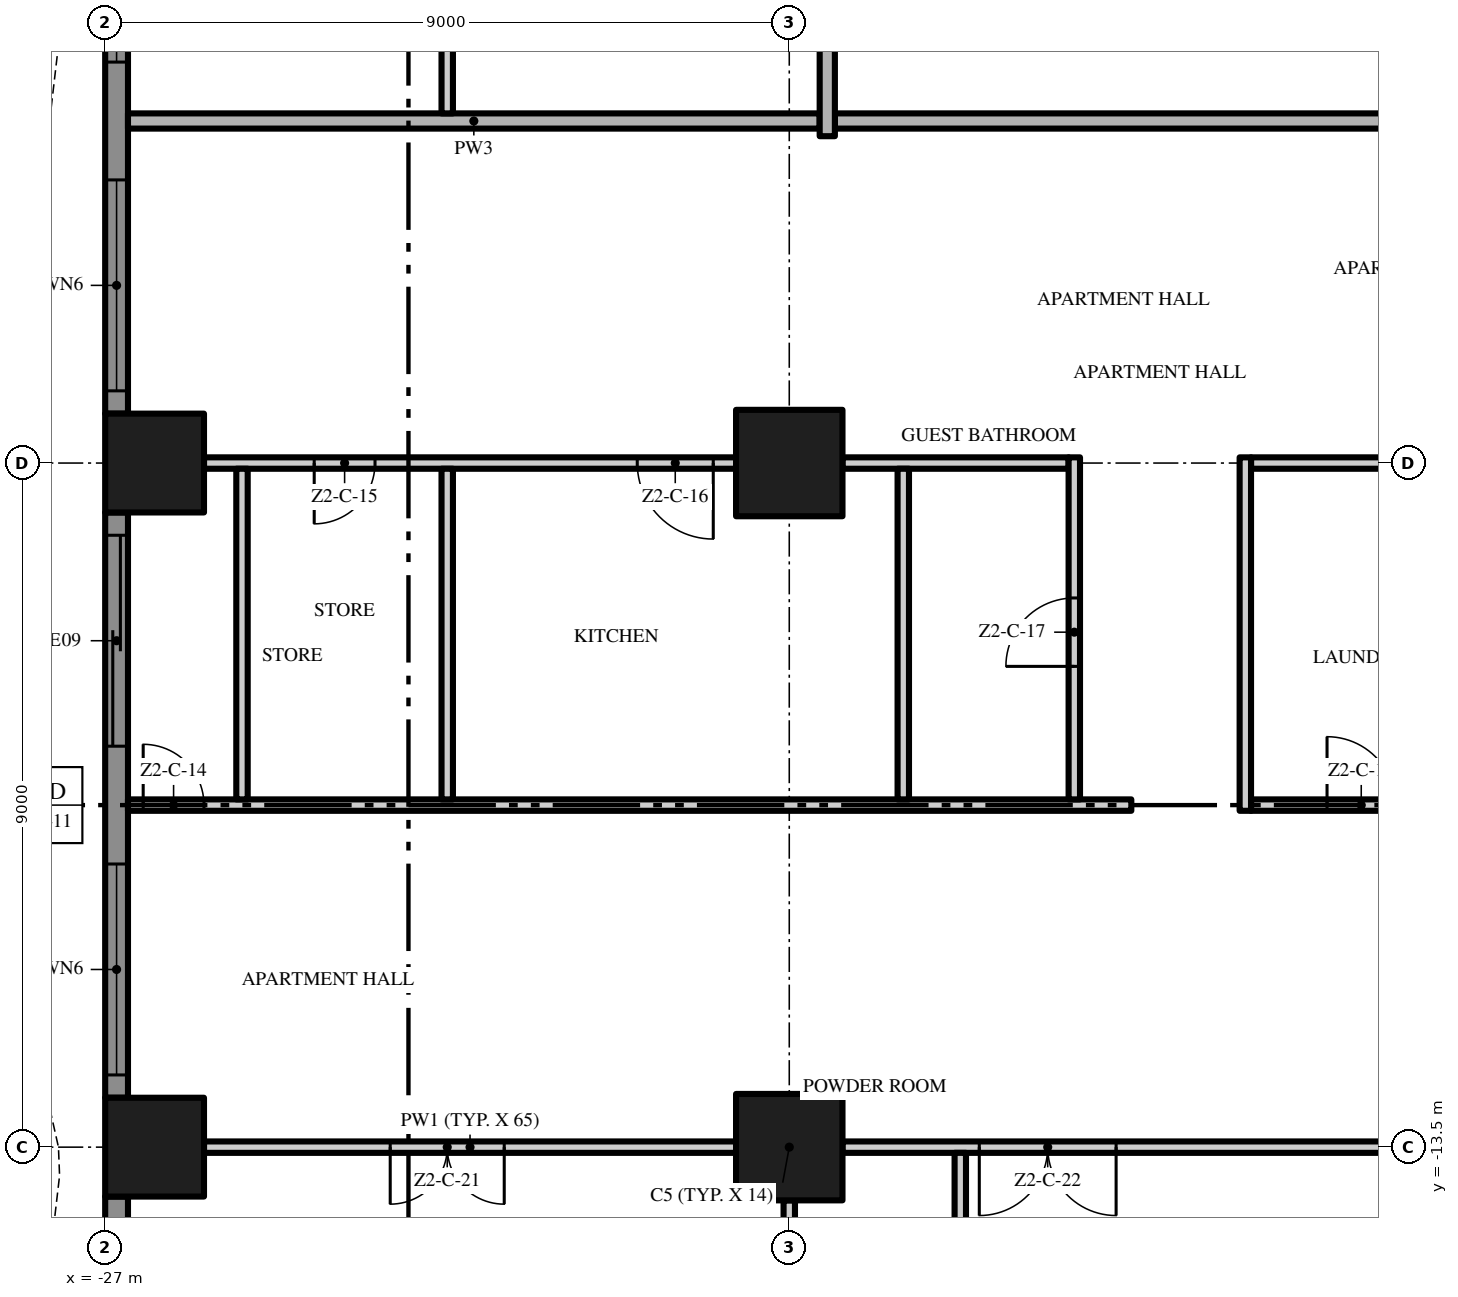
"""IFC4 building model, lengths in metres.
Left out: names, types, materials, properties, quantities, classifications, styles, units other than length and angle.
Written with IfcOpenShell. Run it as: python <this file> out.ifc"""

import sys

from ifc_helpers import new_model, si_unit, direction, frame, frame_2d, origin, origin_2d, place, context, subcontext, project, spatial, polyline, rectangle, outline, extrude, element, fill, save


model = new_model("IFC4")
c1 = context("Model", 3, precision=1e-05, world=origin(), true_north=direction((0.0, 1.0)))
c2 = subcontext(c1, "Body", "Model", "MODEL_VIEW")
j1 = project(units=[si_unit("LENGTHUNIT", "METRE"), si_unit("PLANEANGLEUNIT", "RADIAN")], contexts=[c1])
p1 = place(None, origin())
s1 = spatial("IfcSite", under=j1, at=p1, CompositionType="ELEMENT")
p2 = place(p1, origin())
s2 = spatial("IfcBuilding", under=s1, at=p2, CompositionType="ELEMENT")
p3 = place(p2, frame((0.0, 0.0, 96.0)))
s3 = spatial("IfcBuildingStorey", under=s2, at=p3, CompositionType="ELEMENT", Elevation=96.0)
for number, where, z_axis, x_axis in (
    (1, (-18.0, -13.5, 0.0), (0.0, 0.0, 1.0), (1.0, 0.0, 0.0)),
    (2, (-18.0, -4.5, 0.0), (0.0, 0.0, 1.0), (1.0, 0.0, 0.0)),
):
    element("IfcColumn", number, at=place(p3, frame(where, z_axis=z_axis, x_axis=x_axis)), inside=s3, PredefinedType="COLUMN", context=c2, shape_type="SweptSolid", body=[
        extrude(rectangle(XDim=1.4, YDim=1.4, at=origin_2d()), origin(), (0.0, 0.0, 1.0), 3.5),
    ])
for number, where, z_axis, x_axis in (
    (3, (-26.35, -13.5, 0.0), (0.0, 0.0, 1.0), (1.0, 0.0, 0.0)),
    (4, (-26.35, -4.5, 0.0), (0.0, 0.0, 1.0), (1.0, 0.0, 0.0)),
):
    element("IfcColumn", number, at=place(p3, frame(where, z_axis=z_axis, x_axis=x_axis)), inside=s3, PredefinedType="COLUMN", context=c2, shape_type="SweptSolid", body=[
        extrude(rectangle(XDim=1.3, YDim=1.3, at=origin_2d()), origin(), (0.0, 0.0, 1.0), 3.5),
    ])
p4 = place(p3, frame((-26.85, -3.85, 0.0), z_axis=(0.0, 0.0, 1.0), x_axis=(0.0, 1.0, 0.0)))
e5 = element("IfcWall", 5, at=p4, inside=s3, PredefinedType="SOLIDWALL", context=c2, shape_type="SweptSolid", body=[
    extrude(rectangle(XDim=7.7, YDim=0.3, at=frame_2d((3.85, 0.0))), origin(), (0.0, 0.0, 1.0), 3.5),
])
p5 = place(p4, frame((4.625, 0.0, 0.45)))
e6 = element("IfcOpeningElement", 6, at=p5, cuts=e5, PredefinedType="OPENING", context=c2, shape_type="SweptSolid", body=[
    extrude(rectangle(XDim=2.775, YDim=2.65, at=frame_2d((1.387, 1.325))), frame((0.0, 0.16, 0.0), z_axis=(0.0, -1.0, 0.0), x_axis=(1.0, 0.0, 0.0)), (0.0, 0.0, 1.0), 0.32),
])
p6 = place(p4, frame((0.3, 0.0, 0.45)))
e7 = element("IfcOpeningElement", 7, at=p6, cuts=e5, PredefinedType="OPENING", context=c2, shape_type="SweptSolid", body=[
    extrude(rectangle(XDim=2.775, YDim=2.65, at=frame_2d((1.387, 1.325))), frame((0.0, 0.16, 0.0), z_axis=(0.0, -1.0, 0.0), x_axis=(1.0, 0.0, 0.0)), (0.0, 0.0, 1.0), 0.32),
])
p7 = place(p3, frame((-26.85, -12.85, 0.0), z_axis=(0.0, 0.0, 1.0), x_axis=(0.0, 1.0, 0.0)))
e8 = element("IfcWall", 8, at=p7, inside=s3, PredefinedType="SOLIDWALL", context=c2, shape_type="SweptSolid", body=[
    extrude(rectangle(XDim=7.7, YDim=0.3, at=frame_2d((3.85, 0.0))), origin(), (0.0, 0.0, 1.0), 3.5),
])
p8 = place(p7, frame((4.625, 0.0, 0.0)))
e9 = element("IfcOpeningElement", 9, at=p8, cuts=e8, PredefinedType="OPENING", context=c2, shape_type="SweptSolid", body=[
    extrude(rectangle(XDim=2.775, YDim=2.4, at=frame_2d((1.387, 1.2))), frame((0.0, 0.16, 0.0), z_axis=(0.0, -1.0, 0.0), x_axis=(1.0, 0.0, 0.0)), (0.0, 0.0, 1.0), 0.32),
])
p9 = place(p7, frame((0.3, 0.0, 0.45)))
e10 = element("IfcOpeningElement", 10, at=p9, cuts=e8, PredefinedType="OPENING", context=c2, shape_type="SweptSolid", body=[
    extrude(rectangle(XDim=2.775, YDim=2.65, at=frame_2d((1.387, 1.325))), frame((0.0, 0.16, 0.0), z_axis=(0.0, -1.0, 0.0), x_axis=(1.0, 0.0, 0.0)), (0.0, 0.0, 1.0), 0.32),
])
p10 = place(p3, frame((-26.85, -18.0, 0.0), z_axis=(0.0, 0.0, 1.0), x_axis=(0.0, 1.0, 0.0)))
e11 = element("IfcWall", 11, at=p10, inside=s3, PredefinedType="SOLIDWALL", context=c2, shape_type="SweptSolid", body=[
    extrude(rectangle(XDim=3.85, YDim=0.3, at=frame_2d((1.925, 0.0))), origin(), (0.0, 0.0, 1.0), 3.5),
])
p11 = place(p10, frame((0.775, 0.0, 0.45)))
e12 = element("IfcOpeningElement", 12, at=p11, cuts=e11, PredefinedType="OPENING", context=c2, shape_type="SweptSolid", body=[
    extrude(rectangle(XDim=2.775, YDim=2.65, at=frame_2d((1.387, 1.325))), frame((0.0, 0.16, 0.0), z_axis=(0.0, -1.0, 0.0), x_axis=(1.0, 0.0, 0.0)), (0.0, 0.0, 1.0), 0.32),
])
p12 = place(p3, origin())
e13 = element("IfcWall", 13, at=p12, inside=s3, PredefinedType="USERDEFINED", context=c2, shape_type="SweptSolid", body=[
    extrude(outline(polyline([(-27.951, 18.0), (-27.615, 16.5), (-27.6, 16.125), (-27.731, 15.0), (-28.255, 13.5), (-28.988, 12.0), (-29.649, 10.5), (-29.985, 9.0), (-30.0, 8.625), (-29.869, 7.5), (-29.345, 6.0), (-28.612, 4.5), (-27.951, 3.0), (-27.615, 1.5), (-27.6, 1.125), (-27.731, 0.0), (-28.255, -1.5), (-28.988, -3.0), (-29.649, -4.5), (-29.985, -6.0), (-30.0, -6.375), (-29.869, -7.5), (-29.345, -9.0), (-28.612, -10.5), (-27.951, -12.0), (-27.615, -13.5), (-27.6, -13.875), (-27.731, -15.0), (-28.255, -16.5), (-28.988, -18.0), (-28.763, -18.11), (-28.024, -16.596), (-27.486, -15.056), (-27.349, -13.885), (-27.366, -13.467), (-27.713, -11.921), (-28.385, -10.395), (-29.114, -8.904), (-29.624, -7.444), (-29.749, -6.365), (-29.736, -6.033), (-29.41, -4.579), (-28.761, -3.105), (-28.024, -1.596), (-27.486, -0.056), (-27.349, 1.115), (-27.366, 1.533), (-27.713, 3.079), (-28.385, 4.605), (-29.114, 6.096), (-29.624, 7.556), (-29.749, 8.635), (-29.736, 8.967), (-29.41, 10.421), (-28.761, 11.895), (-28.024, 13.404), (-27.486, 14.944), (-27.349, 16.115), (-27.366, 16.533), (-27.708, 18.055), (-27.951, 18.0)])), origin(), (0.0, 0.0, 1.0), 0.9),
])
p13 = place(p3, frame((-18.7, -13.5, 0.0), z_axis=(0.0, 0.0, 1.0), x_axis=(-1.0, 0.0, 0.0)))
e14 = element("IfcWall", 14, at=p13, inside=s3, PredefinedType="PARTITIONING", context=c2, shape_type="SweptSolid", body=[
    extrude(rectangle(XDim=7.0, YDim=0.15, at=frame_2d((3.5, 0.0))), origin(), (0.0, 0.0, 1.0), 3.5),
])
p14 = place(p13, frame((3.05, 0.0, 0.0)))
e15 = element("IfcOpeningElement", 15, at=p14, cuts=e14, PredefinedType="OPENING", context=c2, shape_type="SweptSolid", body=[
    extrude(rectangle(XDim=1.5, YDim=2.4, at=frame_2d((0.75, 1.2))), frame((0.0, 0.085, 0.0), z_axis=(0.0, -1.0, 0.0), x_axis=(1.0, 0.0, 0.0)), (0.0, 0.0, 1.0), 0.17),
])
p15 = place(p3, frame((-9.7, -13.5, 0.0), z_axis=(0.0, 0.0, 1.0), x_axis=(-1.0, 0.0, 0.0)))
e16 = element("IfcWall", 16, at=p15, inside=s3, PredefinedType="PARTITIONING", context=c2, shape_type="SweptSolid", body=[
    extrude(rectangle(XDim=7.6, YDim=0.15, at=frame_2d((3.8, 0.0))), origin(), (0.0, 0.0, 1.0), 3.5),
])
p16 = place(p15, frame((4.0, 0.0, 0.0)))
e17 = element("IfcOpeningElement", 17, at=p16, cuts=e16, PredefinedType="OPENING", context=c2, shape_type="SweptSolid", body=[
    extrude(rectangle(XDim=1.8, YDim=2.4, at=frame_2d((0.9, 1.2))), frame((0.0, 0.085, 0.0), z_axis=(0.0, -1.0, 0.0), x_axis=(1.0, 0.0, 0.0)), (0.0, 0.0, 1.0), 0.17),
])
p17 = place(p3, frame((-26.7, -9.0, 0.0), z_axis=(0.0, 0.0, 1.0), x_axis=(1.0, 0.0, 0.0)))
e18 = element("IfcWall", 18, at=p17, inside=s3, PredefinedType="PARTITIONING", context=c2, shape_type="SweptSolid", body=[
    extrude(rectangle(XDim=13.2, YDim=0.15, at=frame_2d((6.6, 0.0))), origin(), (0.0, 0.0, 1.0), 3.5),
])
p18 = place(p17, frame((0.2, 0.0, 0.0)))
e19 = element("IfcOpeningElement", 19, at=p18, cuts=e18, PredefinedType="OPENING", context=c2, shape_type="SweptSolid", body=[
    extrude(rectangle(XDim=0.8, YDim=2.0, at=frame_2d((0.4, 1.0))), frame((0.0, 0.085, 0.0), z_axis=(0.0, -1.0, 0.0), x_axis=(1.0, 0.0, 0.0)), (0.0, 0.0, 1.0), 0.17),
])
p19 = place(p3, frame((-11.925, -9.0, 0.0), z_axis=(0.0, 0.0, 1.0), x_axis=(1.0, 0.0, 0.0)))
e20 = element("IfcWall", 20, at=p19, inside=s3, PredefinedType="PARTITIONING", context=c2, shape_type="SweptSolid", body=[
    extrude(rectangle(XDim=11.825, YDim=0.15, at=frame_2d((5.912, 0.0))), origin(), (0.0, 0.0, 1.0), 3.5),
])
p20 = place(p19, frame((1.0, 0.0, 0.0)))
e21 = element("IfcOpeningElement", 21, at=p20, cuts=e20, PredefinedType="OPENING", context=c2, shape_type="SweptSolid", body=[
    extrude(rectangle(XDim=0.9, YDim=2.1, at=frame_2d((0.45, 1.05))), frame((0.0, 0.085, 0.0), z_axis=(0.0, -1.0, 0.0), x_axis=(1.0, 0.0, 0.0)), (0.0, 0.0, 1.0), 0.17),
])
p21 = place(p19, frame((5.075, 0.0, 0.0)))
e22 = element("IfcOpeningElement", 22, at=p21, cuts=e20, PredefinedType="OPENING", context=c2, shape_type="SweptSolid", body=[
    extrude(rectangle(XDim=0.9, YDim=2.1, at=frame_2d((0.45, 1.05))), frame((0.0, 0.085, 0.0), z_axis=(0.0, -1.0, 0.0), x_axis=(1.0, 0.0, 0.0)), (0.0, 0.0, 1.0), 0.17),
])
p22 = place(p3, frame((-18.7, -4.5, 0.0), z_axis=(0.0, 0.0, 1.0), x_axis=(-1.0, 0.0, 0.0)))
e23 = element("IfcWall", 23, at=p22, inside=s3, PredefinedType="PARTITIONING", context=c2, shape_type="SweptSolid", body=[
    extrude(rectangle(XDim=7.0, YDim=0.15, at=frame_2d((3.5, 0.0))), origin(), (0.0, 0.0, 1.0), 3.5),
])
p23 = place(p22, frame((4.75, 0.0, 0.0)))
e24 = element("IfcOpeningElement", 24, at=p23, cuts=e23, PredefinedType="OPENING", context=c2, shape_type="SweptSolid", body=[
    extrude(rectangle(XDim=0.8, YDim=2.0, at=frame_2d((0.4, 1.0))), frame((0.0, 0.085, 0.0), z_axis=(0.0, -1.0, 0.0), x_axis=(1.0, 0.0, 0.0)), (0.0, 0.0, 1.0), 0.17),
])
p24 = place(p22, frame((0.3, 0.0, 0.0)))
e25 = element("IfcOpeningElement", 25, at=p24, cuts=e23, PredefinedType="OPENING", context=c2, shape_type="SweptSolid", body=[
    extrude(rectangle(XDim=1.0, YDim=2.4, at=frame_2d((0.5, 1.2))), frame((0.0, 0.085, 0.0), z_axis=(0.0, -1.0, 0.0), x_axis=(1.0, 0.0, 0.0)), (0.0, 0.0, 1.0), 0.17),
])
p25 = place(p3, frame((-17.3, -4.5, 0.0), z_axis=(0.0, 0.0, 1.0), x_axis=(1.0, 0.0, 0.0)))
e26 = element("IfcWall", 26, at=p25, inside=s3, PredefinedType="PARTITIONING", context=c2, shape_type="SweptSolid", body=[
    extrude(rectangle(XDim=2.975, YDim=0.15, at=frame_2d((1.488, 0.0))), origin(), (0.0, 0.0, 1.0), 3.5),
])
p26 = place(p3, frame((-11.925, -4.5, 0.0), z_axis=(0.0, 0.0, 1.0), x_axis=(1.0, 0.0, 0.0)))
e27 = element("IfcWall", 27, at=p26, inside=s3, PredefinedType="PARTITIONING", context=c2, shape_type="SweptSolid", body=[
    extrude(rectangle(XDim=2.225, YDim=0.15, at=frame_2d((1.113, 0.0))), origin(), (0.0, 0.0, 1.0), 3.5),
])
p27 = place(p3, frame((-0.1, 0.0, 0.0), z_axis=(0.0, 0.0, 1.0), x_axis=(-1.0, 0.0, 0.0)))
e28 = element("IfcWall", 28, at=p27, inside=s3, PredefinedType="PARTITIONING", context=c2, shape_type="SweptSolid", body=[
    extrude(rectangle(XDim=17.3, YDim=0.2, at=frame_2d((8.65, 0.0))), origin(), (0.0, 0.0, 1.0), 3.5),
])
p28 = place(p27, frame((8.15, 0.0, 0.0)))
e29 = element("IfcOpeningElement", 29, at=p28, cuts=e28, PredefinedType="OPENING", context=c2, shape_type="SweptSolid", body=[
    extrude(rectangle(XDim=1.5, YDim=2.4, at=frame_2d((0.75, 1.2))), frame((0.0, 0.11, 0.0), z_axis=(0.0, -1.0, 0.0), x_axis=(1.0, 0.0, 0.0)), (0.0, 0.0, 1.0), 0.22),
])
p29 = place(p3, frame((-26.7, 0.0, 0.0), z_axis=(0.0, 0.0, 1.0), x_axis=(1.0, 0.0, 0.0)))
e30 = element("IfcWall", 30, at=p29, inside=s3, PredefinedType="PARTITIONING", context=c2, shape_type="SweptSolid", body=[
    extrude(rectangle(XDim=9.1, YDim=0.2, at=frame_2d((4.55, 0.0))), origin(), (0.0, 0.0, 1.0), 3.5),
])
for number, where, z_axis, x_axis in (
    (31, (-25.2, -8.925, 0.0), (0.0, 0.0, 1.0), (0.0, 1.0, 0.0)),
    (32, (-22.5, -8.925, 0.0), (0.0, 0.0, 1.0), (0.0, 1.0, 0.0)),
):
    element("IfcWall", number, at=place(p3, frame(where, z_axis=z_axis, x_axis=x_axis)), inside=s3, PredefinedType="PARTITIONING", context=c2, shape_type="SweptSolid", body=[
        extrude(rectangle(XDim=4.35, YDim=0.15, at=frame_2d((2.175, 0.0))), origin(), (0.0, 0.0, 1.0), 3.5),
    ])
p30 = place(p3, frame((-22.5, 0.1, 0.0), z_axis=(0.0, 0.0, 1.0), x_axis=(0.0, 1.0, 0.0)))
e33 = element("IfcWall", 33, at=p30, inside=s3, PredefinedType="PARTITIONING", context=c2, shape_type="SweptSolid", body=[
    extrude(rectangle(XDim=17.25, YDim=0.15, at=frame_2d((8.625, 0.0))), origin(), (0.0, 0.0, 1.0), 3.5),
])
p31 = place(p30, frame((1.65, 0.0, 0.0)))
e34 = element("IfcOpeningElement", 34, at=p31, cuts=e33, PredefinedType="OPENING", context=c2, shape_type="SweptSolid", body=[
    extrude(rectangle(XDim=1.0, YDim=2.4, at=frame_2d((0.5, 1.2))), frame((0.0, 0.085, 0.0), z_axis=(0.0, -1.0, 0.0), x_axis=(1.0, 0.0, 0.0)), (0.0, 0.0, 1.0), 0.17),
])
p32 = place(p30, frame((7.25, 0.0, 0.0)))
e35 = element("IfcOpeningElement", 35, at=p32, cuts=e33, PredefinedType="OPENING", context=c2, shape_type="SweptSolid", body=[
    extrude(rectangle(XDim=1.0, YDim=2.4, at=frame_2d((0.5, 1.2))), frame((0.0, 0.085, 0.0), z_axis=(0.0, -1.0, 0.0), x_axis=(1.0, 0.0, 0.0)), (0.0, 0.0, 1.0), 0.17),
])
p33 = place(p30, frame((11.4, 0.0, 0.0)))
e36 = element("IfcOpeningElement", 36, at=p33, cuts=e33, PredefinedType="OPENING", context=c2, shape_type="SweptSolid", body=[
    extrude(rectangle(XDim=1.8, YDim=2.4, at=frame_2d((0.9, 1.2))), frame((0.0, 0.085, 0.0), z_axis=(0.0, -1.0, 0.0), x_axis=(1.0, 0.0, 0.0)), (0.0, 0.0, 1.0), 0.17),
])
p34 = place(p3, frame((-18.0, -21.2, 0.0), z_axis=(0.0, 0.0, 1.0), x_axis=(0.0, 1.0, 0.0)))
e37 = element("IfcWall", 37, at=p34, inside=s3, PredefinedType="PARTITIONING", context=c2, shape_type="SweptSolid", body=[
    extrude(rectangle(XDim=7.0, YDim=0.15, at=frame_2d((3.5, 0.0))), origin(), (0.0, 0.0, 1.0), 3.5),
])
p35 = place(p3, frame((-17.5, -0.2, 0.0), z_axis=(0.0, 0.0, 1.0), x_axis=(0.0, 1.0, 0.0)))
e38 = element("IfcWall", 38, at=p35, inside=s3, PredefinedType="PARTITIONING", context=c2, shape_type="SweptSolid", body=[
    extrude(rectangle(XDim=4.0, YDim=0.2, at=frame_2d((2.0, 0.0))), origin(), (0.0, 0.0, 1.0), 3.5),
])
p36 = place(p3, frame((-16.5, -8.925, 0.0), z_axis=(0.0, 0.0, 1.0), x_axis=(0.0, 1.0, 0.0)))
e39 = element("IfcWall", 39, at=p36, inside=s3, PredefinedType="PARTITIONING", context=c2, shape_type="SweptSolid", body=[
    extrude(rectangle(XDim=4.35, YDim=0.15, at=frame_2d((2.175, 0.0))), origin(), (0.0, 0.0, 1.0), 3.5),
])
p37 = place(p3, frame((-15.75, -16.575, 0.0), z_axis=(0.0, 0.0, 1.0), x_axis=(0.0, 1.0, 0.0)))
e40 = element("IfcWall", 40, at=p37, inside=s3, PredefinedType="PARTITIONING", context=c2, shape_type="SweptSolid", body=[
    extrude(rectangle(XDim=3.0, YDim=0.15, at=frame_2d((1.5, 0.0))), origin(), (0.0, 0.0, 1.0), 3.5),
])
p38 = place(p3, frame((-14.25, -8.925, 0.0), z_axis=(0.0, 0.0, 1.0), x_axis=(0.0, 1.0, 0.0)))
e41 = element("IfcWall", 41, at=p38, inside=s3, PredefinedType="PARTITIONING", context=c2, shape_type="SweptSolid", body=[
    extrude(rectangle(XDim=4.5, YDim=0.15, at=frame_2d((2.25, 0.0))), origin(), (0.0, 0.0, 1.0), 3.5),
])
p39 = place(p38, frame((1.75, 0.0, 0.0)))
e42 = element("IfcOpeningElement", 42, at=p39, cuts=e41, PredefinedType="OPENING", context=c2, shape_type="SweptSolid", body=[
    extrude(rectangle(XDim=0.9, YDim=2.1, at=frame_2d((0.45, 1.05))), frame((0.0, 0.085, 0.0), z_axis=(0.0, -1.0, 0.0), x_axis=(1.0, 0.0, 0.0)), (0.0, 0.0, 1.0), 0.17),
])
p40 = place(p3, frame((-12.0, -9.075, 0.0), z_axis=(0.0, 0.0, 1.0), x_axis=(0.0, 1.0, 0.0)))
e43 = element("IfcWall", 43, at=p40, inside=s3, PredefinedType="PARTITIONING", context=c2, shape_type="SweptSolid", body=[
    extrude(rectangle(XDim=4.65, YDim=0.15, at=frame_2d((2.325, 0.0))), origin(), (0.0, 0.0, 1.0), 3.5),
])
p41 = place(p5, origin())
e44 = element("IfcWindow", 44, at=p41, inside=s3, PartitioningType="SINGLE_PANEL", PredefinedType="WINDOW", context=c2, shape_type="SweptSolid", body=[
    extrude(rectangle(XDim=2.775, YDim=2.65, at=frame_2d((1.387, 1.325))), frame((0.0, 0.03, 0.0), z_axis=(0.0, -1.0, 0.0), x_axis=(1.0, 0.0, 0.0)), (0.0, 0.0, 1.0), 0.06),
])
fill(e6, e44)
p42 = place(p6, origin())
e45 = element("IfcWindow", 45, at=p42, inside=s3, PartitioningType="SINGLE_PANEL", PredefinedType="WINDOW", context=c2, shape_type="SweptSolid", body=[
    extrude(rectangle(XDim=2.775, YDim=2.65, at=frame_2d((1.387, 1.325))), frame((0.0, 0.03, 0.0), z_axis=(0.0, -1.0, 0.0), x_axis=(1.0, 0.0, 0.0)), (0.0, 0.0, 1.0), 0.06),
])
fill(e7, e45)
p43 = place(p8, origin())
e46 = element("IfcDoor", 46, at=p43, inside=s3, OperationType="SINGLE_SWING_LEFT", PredefinedType="DOOR", context=c2, shape_type="SweptSolid", body=[
    extrude(rectangle(XDim=2.775, YDim=2.4, at=frame_2d((1.387, 1.2))), frame((0.0, 0.025, 0.0), z_axis=(0.0, -1.0, 0.0), x_axis=(1.0, 0.0, 0.0)), (0.0, 0.0, 1.0), 0.05),
])
fill(e9, e46)
p44 = place(p9, origin())
e47 = element("IfcWindow", 47, at=p44, inside=s3, PartitioningType="SINGLE_PANEL", PredefinedType="WINDOW", context=c2, shape_type="SweptSolid", body=[
    extrude(rectangle(XDim=2.775, YDim=2.65, at=frame_2d((1.387, 1.325))), frame((0.0, 0.03, 0.0), z_axis=(0.0, -1.0, 0.0), x_axis=(1.0, 0.0, 0.0)), (0.0, 0.0, 1.0), 0.06),
])
fill(e10, e47)
p45 = place(p18, origin())
e48 = element("IfcDoor", 48, at=p45, inside=s3, OperationType="SINGLE_SWING_LEFT", PredefinedType="DOOR", context=c2, shape_type="SweptSolid", body=[
    extrude(rectangle(XDim=0.8, YDim=2.0, at=frame_2d((0.4, 1.0))), frame((0.0, 0.025, 0.0), z_axis=(0.0, -1.0, 0.0), x_axis=(1.0, 0.0, 0.0)), (0.0, 0.0, 1.0), 0.05),
])
fill(e19, e48)
p46 = place(p23, origin())
e49 = element("IfcDoor", 49, at=p46, inside=s3, OperationType="SINGLE_SWING_RIGHT", PredefinedType="DOOR", context=c2, shape_type="SweptSolid", body=[
    extrude(rectangle(XDim=0.8, YDim=2.0, at=frame_2d((0.4, 1.0))), frame((0.0, 0.025, 0.0), z_axis=(0.0, -1.0, 0.0), x_axis=(1.0, 0.0, 0.0)), (0.0, 0.0, 1.0), 0.05),
])
fill(e24, e49)
p47 = place(p24, origin())
e50 = element("IfcDoor", 50, at=p47, inside=s3, OperationType="SINGLE_SWING_LEFT", PredefinedType="DOOR", context=c2, shape_type="SweptSolid", body=[
    extrude(rectangle(XDim=1.0, YDim=2.4, at=frame_2d((0.5, 1.2))), frame((0.0, 0.025, 0.0), z_axis=(0.0, -1.0, 0.0), x_axis=(1.0, 0.0, 0.0)), (0.0, 0.0, 1.0), 0.05),
])
fill(e25, e50)
p48 = place(p39, origin())
e51 = element("IfcDoor", 51, at=p48, inside=s3, OperationType="SINGLE_SWING_LEFT", PredefinedType="DOOR", context=c2, shape_type="SweptSolid", body=[
    extrude(rectangle(XDim=0.9, YDim=2.1, at=frame_2d((0.45, 1.05))), frame((0.0, 0.025, 0.0), z_axis=(0.0, -1.0, 0.0), x_axis=(1.0, 0.0, 0.0)), (0.0, 0.0, 1.0), 0.05),
])
fill(e42, e51)
p49 = place(p20, origin())
e52 = element("IfcDoor", 52, at=p49, inside=s3, OperationType="SINGLE_SWING_LEFT", PredefinedType="DOOR", context=c2, shape_type="SweptSolid", body=[
    extrude(rectangle(XDim=0.9, YDim=2.1, at=frame_2d((0.45, 1.05))), frame((0.0, 0.025, 0.0), z_axis=(0.0, -1.0, 0.0), x_axis=(1.0, 0.0, 0.0)), (0.0, 0.0, 1.0), 0.05),
])
fill(e21, e52)
p50 = place(p14, origin())
e53 = element("IfcDoor", 53, at=p50, inside=s3, OperationType="DOUBLE_DOOR_SINGLE_SWING", PredefinedType="DOOR", context=c2, shape_type="SweptSolid", body=[
    extrude(rectangle(XDim=1.5, YDim=2.4, at=frame_2d((0.75, 1.2))), frame((0.0, 0.025, 0.0), z_axis=(0.0, -1.0, 0.0), x_axis=(1.0, 0.0, 0.0)), (0.0, 0.0, 1.0), 0.05),
])
fill(e15, e53)
p51 = place(p16, origin())
e54 = element("IfcDoor", 54, at=p51, inside=s3, OperationType="DOUBLE_DOOR_SINGLE_SWING", PredefinedType="DOOR", context=c2, shape_type="SweptSolid", body=[
    extrude(rectangle(XDim=1.8, YDim=2.4, at=frame_2d((0.9, 1.2))), frame((0.0, 0.025, 0.0), z_axis=(0.0, -1.0, 0.0), x_axis=(1.0, 0.0, 0.0)), (0.0, 0.0, 1.0), 0.05),
])
fill(e17, e54)
save(model, sys.argv[1])
